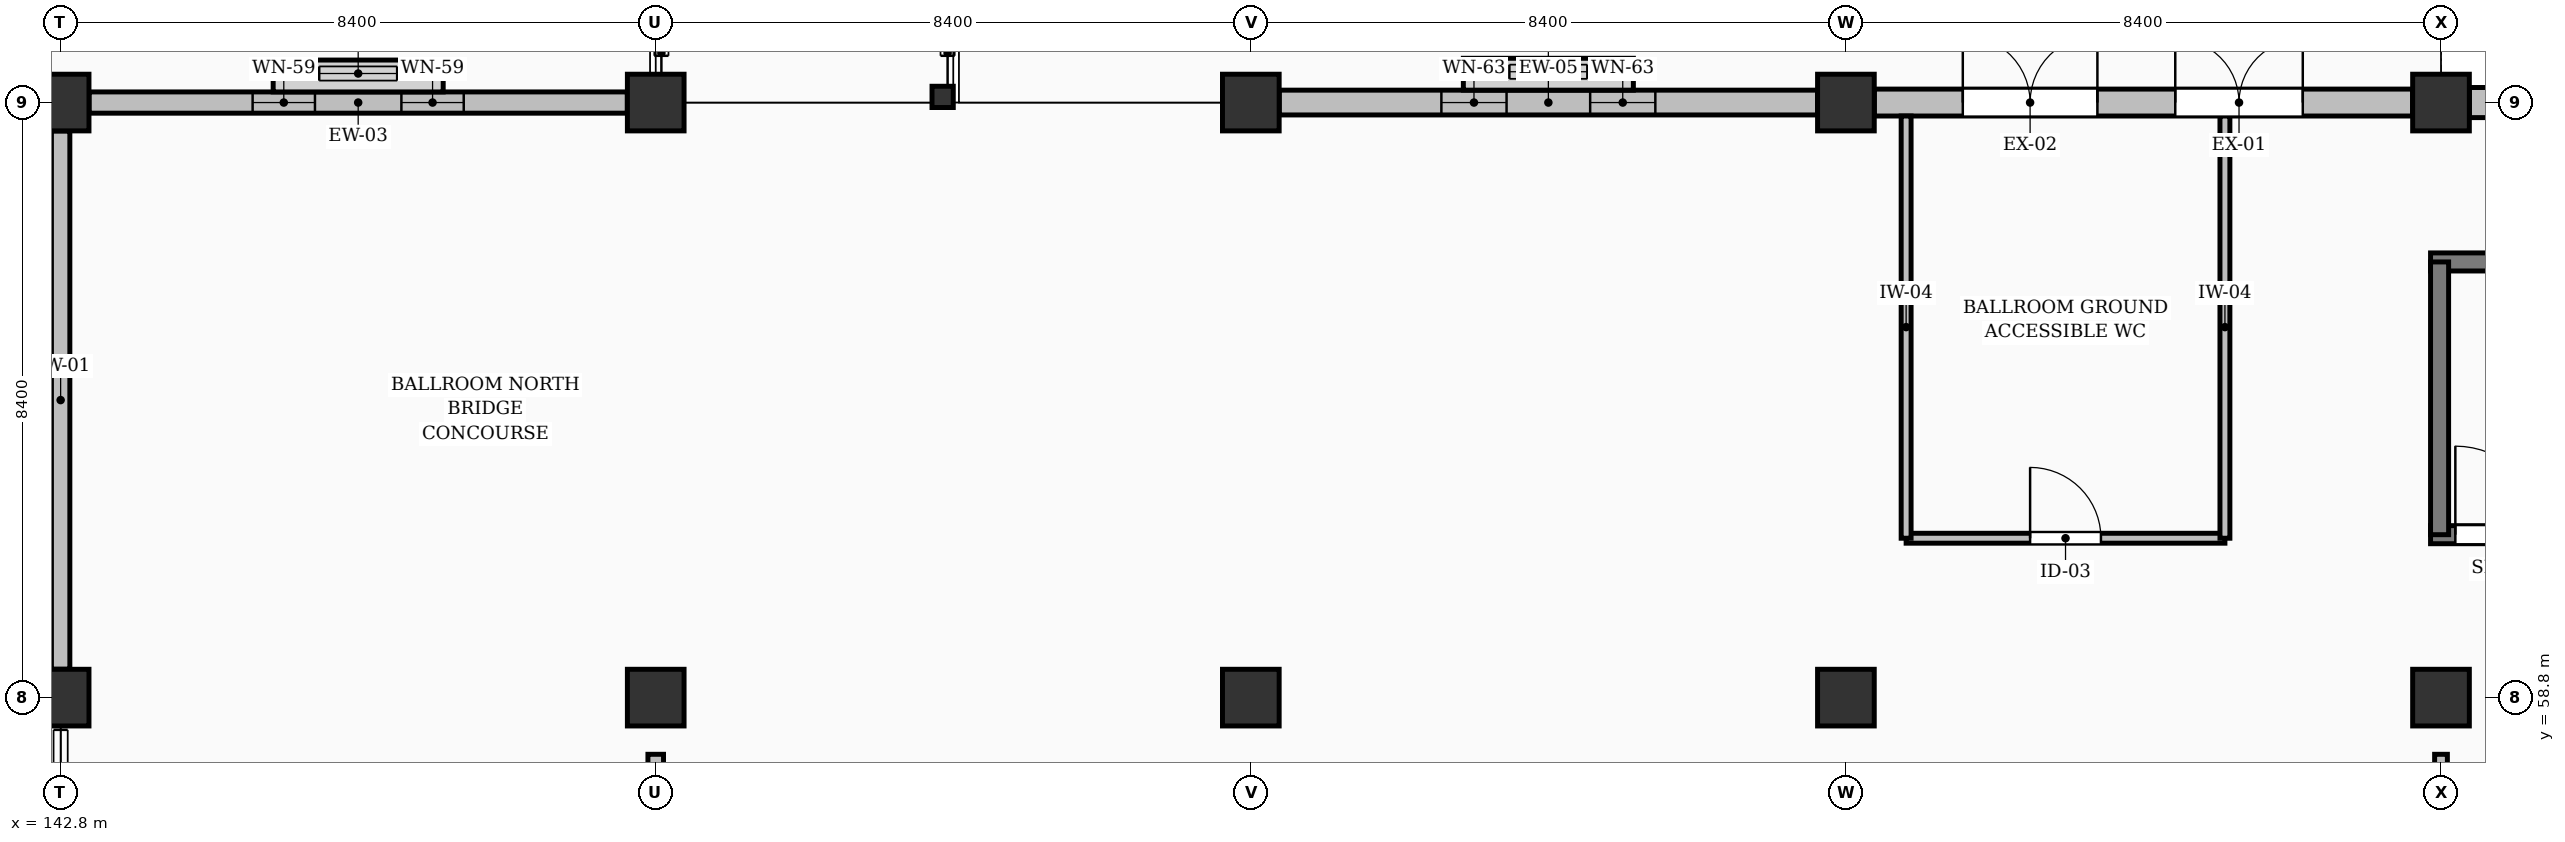
"""IFC4 building model, lengths in metres.
Left out: names, types, materials, properties, quantities, classifications, styles, units other than length and angle.
Written with IfcOpenShell. Run it as: python <this file> out.ifc"""

import sys

from ifc_helpers import new_model, si_unit, direction, frame, frame_2d, origin, origin_2d, place, context, subcontext, project, spatial, rectangle, hollow_rectangle, extrude, element, fill, save


model = new_model("IFC4")
c1 = context("Model", 3, precision=1e-05, world=origin(), true_north=direction((0.0, 1.0)))
c2 = subcontext(c1, "Body", "Model", "MODEL_VIEW")
j1 = project(units=[si_unit("LENGTHUNIT", "METRE"), si_unit("PLANEANGLEUNIT", "RADIAN")], contexts=[c1])
p1 = place(None, origin())
s1 = spatial("IfcSite", under=j1, at=p1, CompositionType="ELEMENT")
p2 = place(p1, origin())
s2 = spatial("IfcBuilding", under=s1, at=p2, CompositionType="ELEMENT")
p3 = place(p2, origin())
s3 = spatial("IfcBuildingStorey", under=s2, at=p3, CompositionType="ELEMENT", Elevation=0.0)
for number, where, z_axis, x_axis in (
    (1, (142.8, 58.8, 0.0), (0.0, 0.0, 1.0), (1.0, 0.0, 0.0)),
    (2, (142.8, 67.2, 0.0), (0.0, 0.0, 1.0), (1.0, 0.0, 0.0)),
    (3, (151.2, 58.8, 0.0), (0.0, 0.0, 1.0), (1.0, 0.0, 0.0)),
    (4, (151.2, 67.2, 0.0), (0.0, 0.0, 1.0), (1.0, 0.0, 0.0)),
    (5, (159.6, 58.8, 0.0), (0.0, 0.0, 1.0), (1.0, 0.0, 0.0)),
    (6, (159.6, 67.2, 0.0), (0.0, 0.0, 1.0), (1.0, 0.0, 0.0)),
    (7, (168.0, 58.8, 0.0), (0.0, 0.0, 1.0), (1.0, 0.0, 0.0)),
    (8, (168.0, 67.2, 0.0), (0.0, 0.0, 1.0), (1.0, 0.0, 0.0)),
    (9, (176.4, 58.8, 0.0), (0.0, 0.0, 1.0), (1.0, 0.0, 0.0)),
    (10, (176.4, 67.2, 0.0), (0.0, 0.0, 1.0), (1.0, 0.0, 0.0)),
):
    element("IfcColumn", number, at=place(p3, frame(where, z_axis=z_axis, x_axis=x_axis)), inside=s3, PredefinedType="COLUMN", context=c2, shape_type="SweptSolid", body=[
        extrude(rectangle(XDim=0.8, YDim=0.8, at=origin_2d()), origin(), (0.0, 0.0, 1.0), 3.92),
    ])
p4 = place(p3, frame((155.25, 67.28, 0.0), z_axis=(0.0, 0.0, 1.0), x_axis=(1.0, 0.0, 0.0)))
e11 = element("IfcColumn", 11, at=p4, inside=s3, PredefinedType="COLUMN", context=c2, shape_type="SweptSolid", body=[
    extrude(hollow_rectangle(XDim=0.3, YDim=0.3, WallThickness=0.016, at=origin_2d()), origin(), (0.0, 0.0, 1.0), 3.92),
])
p5 = place(p3, frame((143.201, 67.2, 0.0), z_axis=(0.0, 0.0, 1.0), x_axis=(1.0, 0.0, 0.0)))
e12 = element("IfcWall", 12, at=p5, inside=s3, PredefinedType="SOLIDWALL", context=c2, shape_type="SweptSolid", body=[
    extrude(rectangle(XDim=7.598, YDim=0.3, at=frame_2d((3.799, 0.0))), origin(), (0.0, 0.0, 1.0), 2.825),
])
p6 = place(p5, frame((2.309, 0.0, 0.3)))
e13 = element("IfcOpeningElement", 13, at=p6, cuts=e12, PredefinedType="OPENING", context=c2, shape_type="SweptSolid", body=[
    extrude(rectangle(XDim=0.88, YDim=2.15, at=frame_2d((0.44, 1.075))), frame((0.0, 0.16, 0.0), z_axis=(0.0, -1.0, 0.0), x_axis=(1.0, 0.0, 0.0)), (0.0, 0.0, 1.0), 0.32),
])
p7 = place(p5, frame((4.409, 0.0, 0.3)))
e14 = element("IfcOpeningElement", 14, at=p7, cuts=e12, PredefinedType="OPENING", context=c2, shape_type="SweptSolid", body=[
    extrude(rectangle(XDim=0.88, YDim=2.15, at=frame_2d((0.44, 1.075))), frame((0.0, 0.16, 0.0), z_axis=(0.0, -1.0, 0.0), x_axis=(1.0, 0.0, 0.0)), (0.0, 0.0, 1.0), 0.32),
])
p8 = place(p3, frame((160.001, 67.2, 0.0), z_axis=(0.0, 0.0, 1.0), x_axis=(1.0, 0.0, 0.0)))
e15 = element("IfcWall", 15, at=p8, inside=s3, PredefinedType="SOLIDWALL", context=c2, shape_type="SweptSolid", body=[
    extrude(rectangle(XDim=7.598, YDim=0.35, at=frame_2d((3.799, 0.0))), origin(), (0.0, 0.0, 1.0), 2.825),
])
p9 = place(p8, frame((2.289, 0.0, 0.3)))
e16 = element("IfcOpeningElement", 16, at=p9, cuts=e15, PredefinedType="OPENING", context=c2, shape_type="SweptSolid", body=[
    extrude(rectangle(XDim=0.92, YDim=1.75, at=frame_2d((0.46, 0.875))), frame((0.0, 0.185, 0.0), z_axis=(0.0, -1.0, 0.0), x_axis=(1.0, 0.0, 0.0)), (0.0, 0.0, 1.0), 0.37),
])
p10 = place(p8, frame((4.389, 0.0, 0.3)))
e17 = element("IfcOpeningElement", 17, at=p10, cuts=e15, PredefinedType="OPENING", context=c2, shape_type="SweptSolid", body=[
    extrude(rectangle(XDim=0.92, YDim=1.75, at=frame_2d((0.46, 0.875))), frame((0.0, 0.185, 0.0), z_axis=(0.0, -1.0, 0.0), x_axis=(1.0, 0.0, 0.0)), (0.0, 0.0, 1.0), 0.37),
])
p11 = place(p3, frame((168.401, 67.2, 0.0), z_axis=(0.0, 0.0, 1.0), x_axis=(1.0, 0.0, 0.0)))
e18 = element("IfcWall", 18, at=p11, inside=s3, PredefinedType="SOLIDWALL", context=c2, shape_type="SweptSolid", body=[
    extrude(rectangle(XDim=7.598, YDim=0.38, at=frame_2d((3.799, 0.0))), origin(), (0.0, 0.0, 1.0), 2.825),
])
p12 = place(p11, frame((1.249, 0.0, 0.0)))
e19 = element("IfcOpeningElement", 19, at=p12, cuts=e18, PredefinedType="OPENING", context=c2, shape_type="SweptSolid", body=[
    extrude(rectangle(XDim=1.9, YDim=2.2, at=frame_2d((0.95, 1.1))), frame((0.0, 0.2, 0.0), z_axis=(0.0, -1.0, 0.0), x_axis=(1.0, 0.0, 0.0)), (0.0, 0.0, 1.0), 0.4),
])
p13 = place(p11, frame((4.248, 0.0, 0.0)))
e20 = element("IfcOpeningElement", 20, at=p13, cuts=e18, PredefinedType="OPENING", context=c2, shape_type="SweptSolid", body=[
    extrude(rectangle(XDim=1.8, YDim=2.2, at=frame_2d((0.9, 1.1))), frame((0.0, 0.2, 0.0), z_axis=(0.0, -1.0, 0.0), x_axis=(1.0, 0.0, 0.0)), (0.0, 0.0, 1.0), 0.4),
])
p14 = place(p3, frame((176.801, 67.2, 0.0), z_axis=(0.0, 0.0, 1.0), x_axis=(1.0, 0.0, 0.0)))
e21 = element("IfcWall", 21, at=p14, inside=s3, PredefinedType="SOLIDWALL", context=c2, shape_type="SweptSolid", body=[
    extrude(rectangle(XDim=7.598, YDim=0.425, at=frame_2d((3.799, 0.0))), origin(), (0.0, 0.0, 1.0), 2.825),
])
p15 = place(p14, frame((2.324, 0.0, 0.3)))
e22 = element("IfcOpeningElement", 22, at=p15, cuts=e21, PredefinedType="OPENING", context=c2, shape_type="SweptSolid", body=[
    extrude(rectangle(XDim=0.85, YDim=1.9, at=frame_2d((0.425, 0.95))), frame((0.0, 0.223, 0.0), z_axis=(0.0, -1.0, 0.0), x_axis=(1.0, 0.0, 0.0)), (0.0, 0.0, 1.0), 0.445),
])
p16 = place(p14, frame((4.424, 0.0, 0.3)))
e23 = element("IfcOpeningElement", 23, at=p16, cuts=e21, PredefinedType="OPENING", context=c2, shape_type="SweptSolid", body=[
    extrude(rectangle(XDim=0.85, YDim=1.9, at=frame_2d((0.425, 0.95))), frame((0.0, 0.223, 0.0), z_axis=(0.0, -1.0, 0.0), x_axis=(1.0, 0.0, 0.0)), (0.0, 0.0, 1.0), 0.445),
])
p17 = place(p3, frame((142.8, 59.201, 0.0), z_axis=(0.0, 0.0, 1.0), x_axis=(0.0, 1.0, 0.0)))
e24 = element("IfcWall", 24, at=p17, inside=s3, PredefinedType="SOLIDWALL", context=c2, shape_type="SweptSolid", body=[
    extrude(rectangle(XDim=7.598, YDim=0.26, at=frame_2d((3.799, 0.0))), origin(), (0.0, 0.0, 1.0), 2.975),
])
p18 = place(p3, frame((176.252, 61.1, 0.0), z_axis=(0.0, 0.0, 1.0), x_axis=(1.0, 0.0, 0.0)))
e25 = element("IfcWall", 25, at=p18, inside=s3, PredefinedType="SOLIDWALL", context=c2, shape_type="SweptSolid", body=[
    extrude(rectangle(XDim=8.225, YDim=0.255, at=frame_2d((4.113, 0.0))), origin(), (0.0, 0.0, 1.0), 3.64),
])
p19 = place(p18, frame((0.35, 0.0, 0.0)))
e26 = element("IfcOpeningElement", 26, at=p19, cuts=e25, PredefinedType="OPENING", context=c2, shape_type="SweptSolid", body=[
    extrude(rectangle(XDim=1.25, YDim=2.2, at=frame_2d((0.625, 1.1))), frame((0.0, 0.137, 0.0), z_axis=(0.0, -1.0, 0.0), x_axis=(1.0, 0.0, 0.0)), (0.0, 0.0, 1.0), 0.275),
])
p20 = place(p3, frame((176.252, 64.95, 0.0), z_axis=(0.0, 0.0, 1.0), x_axis=(1.0, 0.0, 0.0)))
e27 = element("IfcWall", 27, at=p20, inside=s3, PredefinedType="SOLIDWALL", context=c2, shape_type="SweptSolid", body=[
    extrude(rectangle(XDim=8.225, YDim=0.255, at=frame_2d((4.113, 0.0))), origin(), (0.0, 0.0, 1.0), 3.64),
])
p21 = place(p3, frame((176.38, 61.1, 0.0), z_axis=(0.0, 0.0, 1.0), x_axis=(0.0, 1.0, 0.0)))
e28 = element("IfcWall", 28, at=p21, inside=s3, PredefinedType="SOLIDWALL", context=c2, shape_type="SweptSolid", body=[
    extrude(rectangle(XDim=3.85, YDim=0.255, at=frame_2d((1.925, 0.0))), origin(), (0.0, 0.0, 1.0), 3.64),
])
p22 = place(p3, frame((151.2, 17.4, 0.0), z_axis=(0.0, 0.0, 1.0), x_axis=(0.0, 1.0, 0.0)))
e29 = element("IfcWall", 29, at=p22, inside=s3, PredefinedType="SOLIDWALL", context=c2, shape_type="SweptSolid", body=[
    extrude(rectangle(XDim=40.6, YDim=0.22, at=frame_2d((20.3, 0.0))), origin(), (0.0, 0.0, 1.0), 3.64),
])
p23 = place(p22, frame((8.0, 0.0, 0.0)))
e30 = element("IfcOpeningElement", 30, at=p23, cuts=e29, PredefinedType="OPENING", context=c2, shape_type="SweptSolid", body=[
    extrude(rectangle(XDim=2.05, YDim=2.4, at=frame_2d((1.025, 1.2))), frame((0.0, 0.12, 0.0), z_axis=(0.0, -1.0, 0.0), x_axis=(1.0, 0.0, 0.0)), (0.0, 0.0, 1.0), 0.24),
])
p24 = place(p22, frame((28.0, 0.0, 0.0)))
e31 = element("IfcOpeningElement", 31, at=p24, cuts=e29, PredefinedType="OPENING", context=c2, shape_type="SweptSolid", body=[
    extrude(rectangle(XDim=2.05, YDim=2.4, at=frame_2d((1.025, 1.2))), frame((0.0, 0.12, 0.0), z_axis=(0.0, -1.0, 0.0), x_axis=(1.0, 0.0, 0.0)), (0.0, 0.0, 1.0), 0.24),
])
p25 = place(p3, frame((176.4, 17.4, 0.0), z_axis=(0.0, 0.0, 1.0), x_axis=(0.0, 1.0, 0.0)))
e32 = element("IfcWall", 32, at=p25, inside=s3, PredefinedType="PARTITIONING", context=c2, shape_type="SweptSolid", body=[
    extrude(rectangle(XDim=40.6, YDim=0.18, at=frame_2d((20.3, 0.0))), origin(), (0.0, 0.0, 1.0), 3.64),
])
p26 = place(p25, frame((12.0, 0.0, 0.0)))
e33 = element("IfcOpeningElement", 33, at=p26, cuts=e32, PredefinedType="OPENING", context=c2, shape_type="SweptSolid", body=[
    extrude(rectangle(XDim=1.22, YDim=2.15, at=frame_2d((0.61, 1.075))), frame((0.0, 0.1, 0.0), z_axis=(0.0, -1.0, 0.0), x_axis=(1.0, 0.0, 0.0)), (0.0, 0.0, 1.0), 0.2),
])
p27 = place(p25, frame((30.0, 0.0, 0.0)))
e34 = element("IfcOpeningElement", 34, at=p27, cuts=e32, PredefinedType="OPENING", context=c2, shape_type="SweptSolid", body=[
    extrude(rectangle(XDim=1.22, YDim=2.15, at=frame_2d((0.61, 1.075))), frame((0.0, 0.1, 0.0), z_axis=(0.0, -1.0, 0.0), x_axis=(1.0, 0.0, 0.0)), (0.0, 0.0, 1.0), 0.2),
])
p28 = place(p3, frame((168.85, 61.05, 0.0), z_axis=(0.0, 0.0, 1.0), x_axis=(1.0, 0.0, 0.0)))
e35 = element("IfcWall", 35, at=p28, inside=s3, PredefinedType="PARTITIONING", context=c2, shape_type="SweptSolid", body=[
    extrude(rectangle(XDim=4.5, YDim=0.14, at=frame_2d((2.25, 0.0))), origin(), (0.0, 0.0, 1.0), 3.64),
])
p29 = place(p28, frame((1.75, 0.0, 0.0)))
e36 = element("IfcOpeningElement", 36, at=p29, cuts=e35, PredefinedType="OPENING", context=c2, shape_type="SweptSolid", body=[
    extrude(rectangle(XDim=1.0, YDim=2.1, at=frame_2d((0.5, 1.05))), frame((0.0, 0.08, 0.0), z_axis=(0.0, -1.0, 0.0), x_axis=(1.0, 0.0, 0.0)), (0.0, 0.0, 1.0), 0.16),
])
for number, where, z_axis, x_axis in (
    (37, (168.85, 61.05, 0.0), (0.0, 0.0, 1.0), (0.0, 1.0, 0.0)),
    (38, (173.35, 61.05, 0.0), (0.0, 0.0, 1.0), (0.0, 1.0, 0.0)),
):
    element("IfcWall", number, at=place(p3, frame(where, z_axis=z_axis, x_axis=x_axis)), inside=s3, PredefinedType="PARTITIONING", context=c2, shape_type="SweptSolid", body=[
        extrude(rectangle(XDim=5.96, YDim=0.14, at=frame_2d((2.98, 0.0))), origin(), (0.0, 0.0, 1.0), 3.64),
    ])
p30 = place(p6, origin())
e39 = element("IfcWindow", 39, at=p30, inside=s3, PartitioningType="SINGLE_PANEL", PredefinedType="WINDOW", context=c2, shape_type="SweptSolid", body=[
    extrude(rectangle(XDim=0.88, YDim=2.15, at=frame_2d((0.44, 1.075))), frame((0.0, 0.03, 0.0), z_axis=(0.0, -1.0, 0.0), x_axis=(1.0, 0.0, 0.0)), (0.0, 0.0, 1.0), 0.06),
])
fill(e13, e39)
p31 = place(p7, origin())
e40 = element("IfcWindow", 40, at=p31, inside=s3, PartitioningType="SINGLE_PANEL", PredefinedType="WINDOW", context=c2, shape_type="SweptSolid", body=[
    extrude(rectangle(XDim=0.88, YDim=2.15, at=frame_2d((0.44, 1.075))), frame((0.0, 0.03, 0.0), z_axis=(0.0, -1.0, 0.0), x_axis=(1.0, 0.0, 0.0)), (0.0, 0.0, 1.0), 0.06),
])
fill(e14, e40)
p32 = place(p9, origin())
e41 = element("IfcWindow", 41, at=p32, inside=s3, PartitioningType="SINGLE_PANEL", PredefinedType="WINDOW", context=c2, shape_type="SweptSolid", body=[
    extrude(rectangle(XDim=0.92, YDim=1.75, at=frame_2d((0.46, 0.875))), frame((0.0, 0.03, 0.0), z_axis=(0.0, -1.0, 0.0), x_axis=(1.0, 0.0, 0.0)), (0.0, 0.0, 1.0), 0.06),
])
fill(e16, e41)
p33 = place(p10, origin())
e42 = element("IfcWindow", 42, at=p33, inside=s3, PartitioningType="SINGLE_PANEL", PredefinedType="WINDOW", context=c2, shape_type="SweptSolid", body=[
    extrude(rectangle(XDim=0.92, YDim=1.75, at=frame_2d((0.46, 0.875))), frame((0.0, 0.03, 0.0), z_axis=(0.0, -1.0, 0.0), x_axis=(1.0, 0.0, 0.0)), (0.0, 0.0, 1.0), 0.06),
])
fill(e17, e42)
p34 = place(p12, origin())
e43 = element("IfcDoor", 43, at=p34, inside=s3, OperationType="DOUBLE_DOOR_SINGLE_SWING", PredefinedType="DOOR", context=c2, shape_type="SweptSolid", body=[
    extrude(rectangle(XDim=1.9, YDim=2.2, at=frame_2d((0.95, 1.1))), frame((0.0, 0.025, 0.0), z_axis=(0.0, -1.0, 0.0), x_axis=(1.0, 0.0, 0.0)), (0.0, 0.0, 1.0), 0.05),
])
fill(e19, e43)
p35 = place(p13, origin())
e44 = element("IfcDoor", 44, at=p35, inside=s3, OperationType="DOUBLE_DOOR_SINGLE_SWING", PredefinedType="DOOR", context=c2, shape_type="SweptSolid", body=[
    extrude(rectangle(XDim=1.8, YDim=2.2, at=frame_2d((0.9, 1.1))), frame((0.0, 0.025, 0.0), z_axis=(0.0, -1.0, 0.0), x_axis=(1.0, 0.0, 0.0)), (0.0, 0.0, 1.0), 0.05),
])
fill(e20, e44)
p36 = place(p19, origin())
e45 = element("IfcDoor", 45, at=p36, inside=s3, OperationType="SINGLE_SWING_LEFT", PredefinedType="DOOR", context=c2, shape_type="SweptSolid", body=[
    extrude(rectangle(XDim=1.25, YDim=2.2, at=frame_2d((0.625, 1.1))), frame((0.0, 0.025, 0.0), z_axis=(0.0, -1.0, 0.0), x_axis=(1.0, 0.0, 0.0)), (0.0, 0.0, 1.0), 0.05),
])
fill(e26, e45)
p37 = place(p29, origin())
e46 = element("IfcDoor", 46, at=p37, inside=s3, OperationType="SINGLE_SWING_LEFT", PredefinedType="DOOR", context=c2, shape_type="SweptSolid", body=[
    extrude(rectangle(XDim=1.0, YDim=2.1, at=frame_2d((0.5, 1.05))), frame((0.0, 0.025, 0.0), z_axis=(0.0, -1.0, 0.0), x_axis=(1.0, 0.0, 0.0)), (0.0, 0.0, 1.0), 0.05),
])
fill(e36, e46)
save(model, sys.argv[1])
